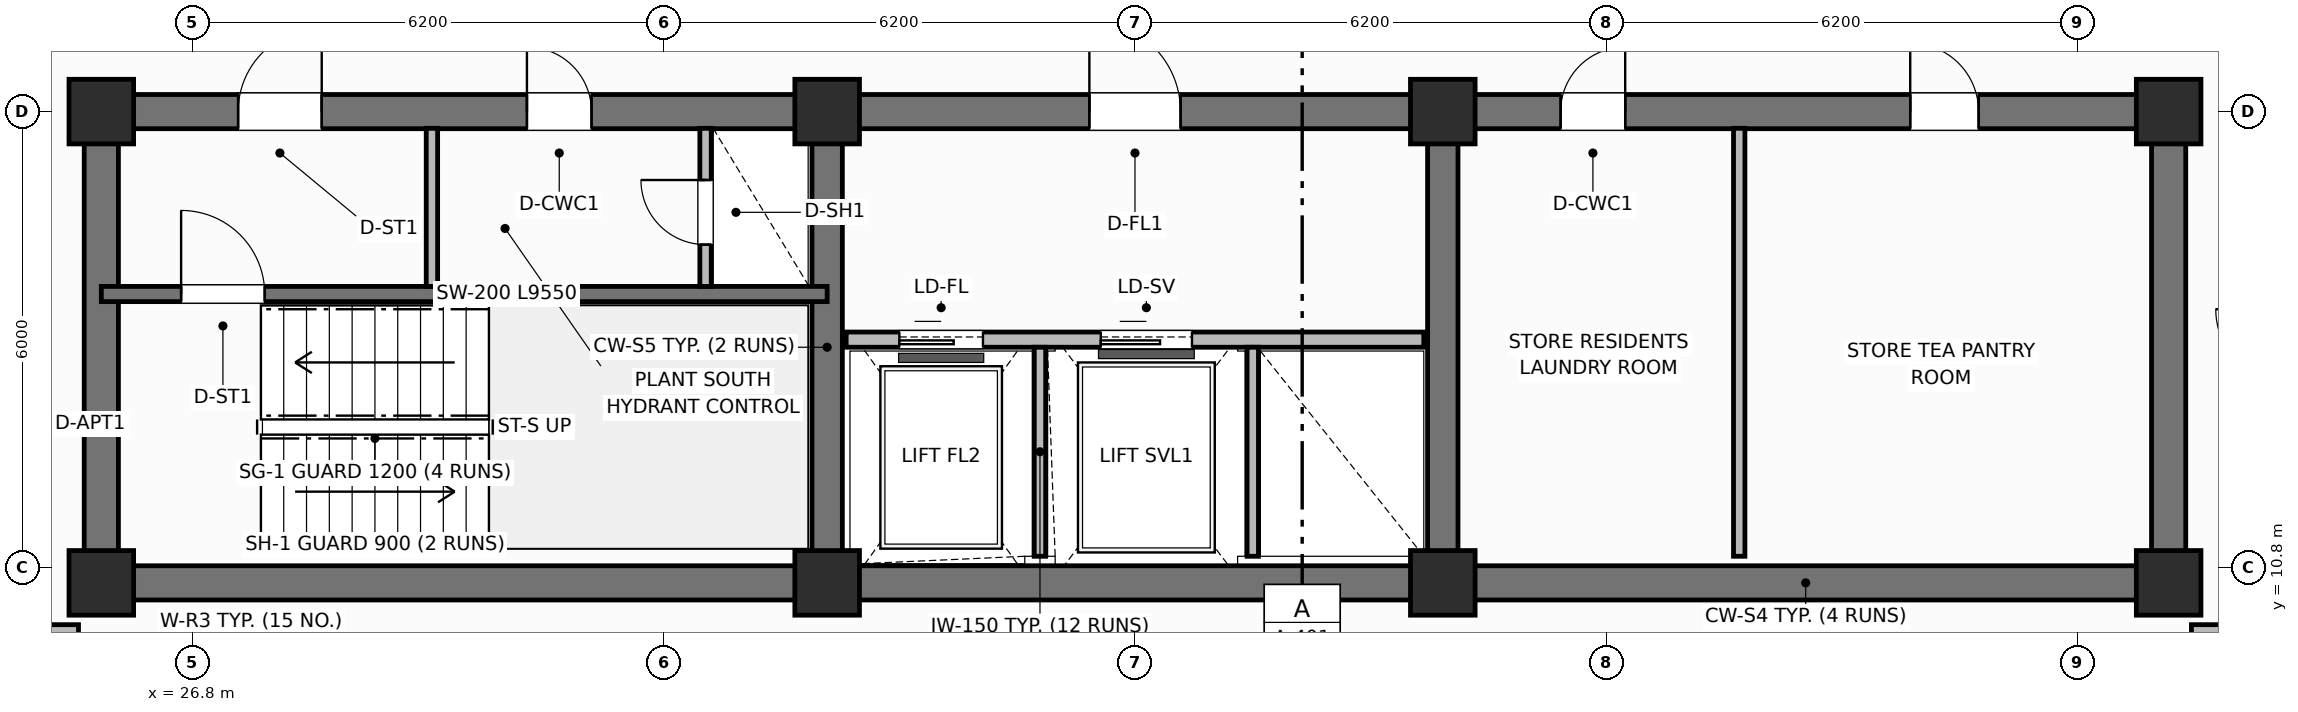
"""IFC4 building model, lengths in metres.
Left out: names, types, materials, properties, quantities, classifications, styles, units other than length and angle.
Written with IfcOpenShell. Run it as: python <this file> out.ifc"""

import sys

from ifc_helpers import new_model, si_unit, direction, frame, frame_2d, origin, origin_2d, place, context, subcontext, project, spatial, rectangle, extrude, element, fill, save


model = new_model("IFC4")
c1 = context("Model", 3, precision=1e-05, world=origin(), true_north=direction((0.0, 1.0)))
c2 = subcontext(c1, "Body", "Model", "MODEL_VIEW")
j1 = project(units=[si_unit("LENGTHUNIT", "METRE"), si_unit("PLANEANGLEUNIT", "RADIAN")], contexts=[c1])
p1 = place(None, origin())
s1 = spatial("IfcSite", under=j1, at=p1, CompositionType="ELEMENT")
p2 = place(p1, origin())
s2 = spatial("IfcBuilding", under=s1, at=p2, CompositionType="ELEMENT")
p3 = place(p2, frame((0.0, 0.0, 251.7)))
s3 = spatial("IfcBuildingStorey", under=s2, at=p3, CompositionType="ELEMENT", Elevation=251.7)
p4 = place(p3, frame((52.8, 10.6, 0.0), z_axis=(0.0, 0.0, 1.0), x_axis=(-1.0, 0.0, 0.0)))
e1 = element("IfcWall", 1, at=p4, inside=s3, PredefinedType="SHEAR", context=c2, shape_type="SweptSolid", body=[
    extrude(rectangle(XDim=27.2, YDim=0.45, at=frame_2d((13.6, 0.0))), origin(), (0.0, 0.0, 1.0), 3.7),
])
for number, where, z_axis, x_axis in (
    (2, (25.6, 10.825, 0.0), (0.0, 0.0, 1.0), (0.0, 1.0, 0.0)),
    (3, (52.8, 10.825, 0.0), (0.0, 0.0, 1.0), (0.0, 1.0, 0.0)),
):
    element("IfcWall", number, at=place(p3, frame(where, z_axis=z_axis, x_axis=x_axis)), inside=s3, PredefinedType="SHEAR", context=c2, shape_type="SweptSolid", body=[
        extrude(rectangle(XDim=5.75, YDim=0.45, at=frame_2d((2.875, 0.0))), origin(), (0.0, 0.0, 1.0), 3.7),
    ])
p5 = place(p3, frame((25.6, 16.8, 0.0), z_axis=(0.0, 0.0, 1.0), x_axis=(1.0, 0.0, 0.0)))
e4 = element("IfcWall", 4, at=p5, inside=s3, PredefinedType="SHEAR", context=c2, shape_type="SweptSolid", body=[
    extrude(rectangle(XDim=27.2, YDim=0.45, at=frame_2d((13.6, 0.0))), origin(), (0.0, 0.0, 1.0), 3.7),
])
p6 = place(p5, frame((1.8, 0.0, 0.0)))
e5 = element("IfcOpeningElement", 5, at=p6, cuts=e4, PredefinedType="OPENING", context=c2, shape_type="SweptSolid", body=[
    extrude(rectangle(XDim=1.1, YDim=2.15, at=frame_2d((0.55, 1.075))), frame((0.0, 0.235, 0.0), z_axis=(0.0, -1.0, 0.0), x_axis=(1.0, 0.0, 0.0)), (0.0, 0.0, 1.0), 0.47),
])
p7 = place(p5, frame((5.6, 0.0, 0.0)))
e6 = element("IfcOpeningElement", 6, at=p7, cuts=e4, PredefinedType="OPENING", context=c2, shape_type="SweptSolid", body=[
    extrude(rectangle(XDim=0.85, YDim=2.1, at=frame_2d((0.425, 1.05))), frame((0.0, 0.235, 0.0), z_axis=(0.0, -1.0, 0.0), x_axis=(1.0, 0.0, 0.0)), (0.0, 0.0, 1.0), 0.47),
])
p8 = place(p5, frame((13.0, 0.0, 0.0)))
e7 = element("IfcOpeningElement", 7, at=p8, cuts=e4, PredefinedType="OPENING", context=c2, shape_type="SweptSolid", body=[
    extrude(rectangle(XDim=1.2, YDim=2.15, at=frame_2d((0.6, 1.075))), frame((0.0, 0.235, 0.0), z_axis=(0.0, -1.0, 0.0), x_axis=(1.0, 0.0, 0.0)), (0.0, 0.0, 1.0), 0.47),
])
p9 = place(p5, frame((19.2, 0.0, 0.0)))
e8 = element("IfcOpeningElement", 8, at=p9, cuts=e4, PredefinedType="OPENING", context=c2, shape_type="SweptSolid", body=[
    extrude(rectangle(XDim=0.85, YDim=2.1, at=frame_2d((0.425, 1.05))), frame((0.0, 0.235, 0.0), z_axis=(0.0, -1.0, 0.0), x_axis=(1.0, 0.0, 0.0)), (0.0, 0.0, 1.0), 0.47),
])
p10 = place(p5, frame((23.8, 0.0, 0.0)))
e9 = element("IfcOpeningElement", 9, at=p10, cuts=e4, PredefinedType="OPENING", context=c2, shape_type="SweptSolid", body=[
    extrude(rectangle(XDim=0.9, YDim=2.1, at=frame_2d((0.45, 1.05))), frame((0.0, 0.235, 0.0), z_axis=(0.0, -1.0, 0.0), x_axis=(1.0, 0.0, 0.0)), (0.0, 0.0, 1.0), 0.47),
])
for number, where, z_axis, x_axis in (
    (10, (35.15, 10.825, 0.0), (0.0, 0.0, 1.0), (0.0, 1.0, 0.0)),
    (11, (43.25, 10.825, 0.0), (0.0, 0.0, 1.0), (0.0, 1.0, 0.0)),
):
    element("IfcWall", number, at=place(p3, frame(where, z_axis=z_axis, x_axis=x_axis)), inside=s3, PredefinedType="SHEAR", context=c2, shape_type="SweptSolid", body=[
        extrude(rectangle(XDim=5.75, YDim=0.4, at=frame_2d((2.875, 0.0))), origin(), (0.0, 0.0, 1.0), 3.7),
    ])
for number, where, z_axis, x_axis in (
    (12, (25.6, 10.6, 0.0), (0.0, 0.0, 1.0), (1.0, 0.0, 0.0)),
    (13, (25.6, 16.8, 0.0), (0.0, 0.0, 1.0), (1.0, 0.0, 0.0)),
    (14, (35.15, 10.6, 0.0), (0.0, 0.0, 1.0), (1.0, 0.0, 0.0)),
    (15, (35.15, 16.8, 0.0), (0.0, 0.0, 1.0), (1.0, 0.0, 0.0)),
    (16, (43.25, 10.6, 0.0), (0.0, 0.0, 1.0), (1.0, 0.0, 0.0)),
    (17, (43.25, 16.8, 0.0), (0.0, 0.0, 1.0), (1.0, 0.0, 0.0)),
    (18, (52.8, 10.6, 0.0), (0.0, 0.0, 1.0), (1.0, 0.0, 0.0)),
    (19, (52.8, 16.8, 0.0), (0.0, 0.0, 1.0), (1.0, 0.0, 0.0)),
):
    element("IfcColumn", number, at=place(p3, frame(where, z_axis=z_axis, x_axis=x_axis)), inside=s3, PredefinedType="COLUMN", context=c2, shape_type="SweptSolid", body=[
        extrude(rectangle(XDim=0.85, YDim=0.85, at=origin_2d()), origin(), (0.0, 0.0, 1.0), 3.7),
    ])
p11 = place(p3, frame((25.6, 14.4, 0.0), z_axis=(0.0, 0.0, 1.0), x_axis=(1.0, 0.0, 0.0)))
e20 = element("IfcWall", 20, at=p11, inside=s3, PredefinedType="SHEAR", context=c2, shape_type="SweptSolid", body=[
    extrude(rectangle(XDim=9.55, YDim=0.2, at=frame_2d((4.775, 0.0))), origin(), (0.0, 0.0, 1.0), 3.7),
])
p12 = place(p11, frame((1.05, 0.0, 0.0)))
e21 = element("IfcOpeningElement", 21, at=p12, cuts=e20, PredefinedType="OPENING", context=c2, shape_type="SweptSolid", body=[
    extrude(rectangle(XDim=1.1, YDim=2.15, at=frame_2d((0.55, 1.075))), frame((0.0, 0.11, 0.0), z_axis=(0.0, -1.0, 0.0), x_axis=(1.0, 0.0, 0.0)), (0.0, 0.0, 1.0), 0.22),
])
p13 = place(p3, frame((29.95, 14.5, 0.0), z_axis=(0.0, 0.0, 1.0), x_axis=(0.0, 1.0, 0.0)))
e22 = element("IfcWall", 22, at=p13, inside=s3, PredefinedType="PARTITIONING", context=c2, shape_type="SweptSolid", body=[
    extrude(rectangle(XDim=2.08, YDim=0.15, at=frame_2d((1.04, 0.0))), origin(), (0.0, 0.0, 1.0), 2.56),
])
p14 = place(p3, frame((33.55, 14.5, 0.0), z_axis=(0.0, 0.0, 1.0), x_axis=(0.0, 1.0, 0.0)))
e23 = element("IfcWall", 23, at=p14, inside=s3, PredefinedType="PARTITIONING", context=c2, shape_type="SweptSolid", body=[
    extrude(rectangle(XDim=2.08, YDim=0.15, at=frame_2d((1.04, 0.0))), origin(), (0.0, 0.0, 1.0), 2.56),
])
p15 = place(p14, frame((0.55, 0.0, 0.0)))
e24 = element("IfcOpeningElement", 24, at=p15, cuts=e23, PredefinedType="OPENING", context=c2, shape_type="SweptSolid", body=[
    extrude(rectangle(XDim=0.85, YDim=2.05, at=frame_2d((0.425, 1.025))), frame((0.0, 0.085, 0.0), z_axis=(0.0, -1.0, 0.0), x_axis=(1.0, 0.0, 0.0)), (0.0, 0.0, 1.0), 0.17),
])
p16 = place(p3, frame((35.4, 13.8, 0.0), z_axis=(0.0, 0.0, 1.0), x_axis=(1.0, 0.0, 0.0)))
e25 = element("IfcWall", 25, at=p16, inside=s3, PredefinedType="PARTITIONING", context=c2, shape_type="SweptSolid", body=[
    extrude(rectangle(XDim=7.6, YDim=0.2, at=frame_2d((3.8, 0.0))), origin(), (0.0, 0.0, 1.0), 2.33),
])
p17 = place(p16, frame((0.7, 0.0, 0.0)))
e26 = element("IfcOpeningElement", 26, at=p17, cuts=e25, PredefinedType="OPENING", context=c2, shape_type="SweptSolid", body=[
    extrude(rectangle(XDim=1.1, YDim=2.15, at=frame_2d((0.55, 1.075))), frame((0.0, 0.11, 0.0), z_axis=(0.0, -1.0, 0.0), x_axis=(1.0, 0.0, 0.0)), (0.0, 0.0, 1.0), 0.22),
])
p18 = place(p16, frame((3.35, 0.0, 0.0)))
e27 = element("IfcOpeningElement", 27, at=p18, cuts=e25, PredefinedType="OPENING", context=c2, shape_type="SweptSolid", body=[
    extrude(rectangle(XDim=1.2, YDim=2.15, at=frame_2d((0.6, 1.075))), frame((0.0, 0.11, 0.0), z_axis=(0.0, -1.0, 0.0), x_axis=(1.0, 0.0, 0.0)), (0.0, 0.0, 1.0), 0.22),
])
for number, where, z_axis, x_axis in (
    (28, (37.95, 10.95, 0.0), (0.0, 0.0, 1.0), (0.0, 1.0, 0.0)),
    (29, (40.75, 10.95, 0.0), (0.0, 0.0, 1.0), (0.0, 1.0, 0.0)),
):
    element("IfcWall", number, at=place(p3, frame(where, z_axis=z_axis, x_axis=x_axis)), inside=s3, PredefinedType="PARTITIONING", context=c2, shape_type="SweptSolid", body=[
        extrude(rectangle(XDim=2.75, YDim=0.15, at=frame_2d((1.375, 0.0))), origin(), (0.0, 0.0, 1.0), 2.56),
    ])
p19 = place(p3, frame((47.15, 10.95, 0.0), z_axis=(0.0, 0.0, 1.0), x_axis=(0.0, 1.0, 0.0)))
e30 = element("IfcWall", 30, at=p19, inside=s3, PredefinedType="PARTITIONING", context=c2, shape_type="SweptSolid", body=[
    extrude(rectangle(XDim=5.63, YDim=0.15, at=frame_2d((2.815, 0.0))), origin(), (0.0, 0.0, 1.0), 2.56),
])
p20 = place(p3, frame((21.546, 9.95, 0.0), z_axis=(0.0, 0.0, 1.0), x_axis=(1.0, 0.0, 0.0)))
e31 = element("IfcWall", 31, at=p20, inside=s3, PredefinedType="PARTITIONING", context=c2, shape_type="SweptSolid", body=[
    extrude(rectangle(XDim=3.754, YDim=0.2, at=frame_2d((1.877, 0.0))), origin(), (0.0, 0.0, 1.0), 2.56),
])
p21 = place(p3, frame((53.1, 9.95, 0.0), z_axis=(0.0, 0.0, 1.0), x_axis=(1.0, 0.0, 0.0)))
e32 = element("IfcWall", 32, at=p21, inside=s3, PredefinedType="PARTITIONING", context=c2, shape_type="SweptSolid", body=[
    extrude(rectangle(XDim=3.754, YDim=0.2, at=frame_2d((1.877, 0.0))), origin(), (0.0, 0.0, 1.0), 2.56),
])
p22 = place(p12, origin())
e33 = element("IfcDoor", 33, at=p22, inside=s3, OperationType="SINGLE_SWING_LEFT", PredefinedType="DOOR", context=c2, shape_type="SweptSolid", body=[
    extrude(rectangle(XDim=1.1, YDim=2.15, at=frame_2d((0.55, 1.075))), frame((0.0, 0.025, 0.0), z_axis=(0.0, -1.0, 0.0), x_axis=(1.0, 0.0, 0.0)), (0.0, 0.0, 1.0), 0.05),
])
fill(e21, e33)
p23 = place(p15, origin())
e34 = element("IfcDoor", 34, at=p23, inside=s3, OperationType="SINGLE_SWING_RIGHT", PredefinedType="TRAPDOOR", context=c2, shape_type="SweptSolid", body=[
    extrude(rectangle(XDim=0.85, YDim=2.05, at=frame_2d((0.425, 1.025))), frame((0.0, 0.025, 0.0), z_axis=(0.0, -1.0, 0.0), x_axis=(1.0, 0.0, 0.0)), (0.0, 0.0, 1.0), 0.05),
])
fill(e24, e34)
p24 = place(p17, origin())
e35 = element("IfcDoor", 35, at=p24, inside=s3, OperationType="SLIDING_TO_LEFT", PredefinedType="DOOR", context=c2, shape_type="SweptSolid", body=[
    extrude(rectangle(XDim=1.1, YDim=2.15, at=frame_2d((0.55, 1.075))), frame((0.0, 0.025, 0.0), z_axis=(0.0, -1.0, 0.0), x_axis=(1.0, 0.0, 0.0)), (0.0, 0.0, 1.0), 0.05),
])
fill(e26, e35)
p25 = place(p18, origin())
e36 = element("IfcDoor", 36, at=p25, inside=s3, OperationType="SLIDING_TO_LEFT", PredefinedType="DOOR", context=c2, shape_type="SweptSolid", body=[
    extrude(rectangle(XDim=1.2, YDim=2.15, at=frame_2d((0.6, 1.075))), frame((0.0, 0.025, 0.0), z_axis=(0.0, -1.0, 0.0), x_axis=(1.0, 0.0, 0.0)), (0.0, 0.0, 1.0), 0.05),
])
fill(e27, e36)
p26 = place(p6, origin())
e37 = element("IfcDoor", 37, at=p26, inside=s3, OperationType="SINGLE_SWING_RIGHT", PredefinedType="DOOR", context=c2, shape_type="SweptSolid", body=[
    extrude(rectangle(XDim=1.1, YDim=2.15, at=frame_2d((0.55, 1.075))), frame((0.0, 0.025, 0.0), z_axis=(0.0, -1.0, 0.0), x_axis=(1.0, 0.0, 0.0)), (0.0, 0.0, 1.0), 0.05),
])
fill(e5, e37)
p27 = place(p7, origin())
e38 = element("IfcDoor", 38, at=p27, inside=s3, OperationType="SINGLE_SWING_LEFT", PredefinedType="DOOR", context=c2, shape_type="SweptSolid", body=[
    extrude(rectangle(XDim=0.85, YDim=2.1, at=frame_2d((0.425, 1.05))), frame((0.0, 0.025, 0.0), z_axis=(0.0, -1.0, 0.0), x_axis=(1.0, 0.0, 0.0)), (0.0, 0.0, 1.0), 0.05),
])
fill(e6, e38)
p28 = place(p8, origin())
e39 = element("IfcDoor", 39, at=p28, inside=s3, OperationType="SINGLE_SWING_LEFT", PredefinedType="DOOR", context=c2, shape_type="SweptSolid", body=[
    extrude(rectangle(XDim=1.2, YDim=2.15, at=frame_2d((0.6, 1.075))), frame((0.0, 0.025, 0.0), z_axis=(0.0, -1.0, 0.0), x_axis=(1.0, 0.0, 0.0)), (0.0, 0.0, 1.0), 0.05),
])
fill(e7, e39)
p29 = place(p9, origin())
e40 = element("IfcDoor", 40, at=p29, inside=s3, OperationType="SINGLE_SWING_RIGHT", PredefinedType="DOOR", context=c2, shape_type="SweptSolid", body=[
    extrude(rectangle(XDim=0.85, YDim=2.1, at=frame_2d((0.425, 1.05))), frame((0.0, 0.025, 0.0), z_axis=(0.0, -1.0, 0.0), x_axis=(1.0, 0.0, 0.0)), (0.0, 0.0, 1.0), 0.05),
])
fill(e8, e40)
p30 = place(p10, origin())
e41 = element("IfcDoor", 41, at=p30, inside=s3, OperationType="SINGLE_SWING_LEFT", PredefinedType="DOOR", context=c2, shape_type="SweptSolid", body=[
    extrude(rectangle(XDim=0.9, YDim=2.1, at=frame_2d((0.45, 1.05))), frame((0.0, 0.025, 0.0), z_axis=(0.0, -1.0, 0.0), x_axis=(1.0, 0.0, 0.0)), (0.0, 0.0, 1.0), 0.05),
])
fill(e9, e41)
save(model, sys.argv[1])
